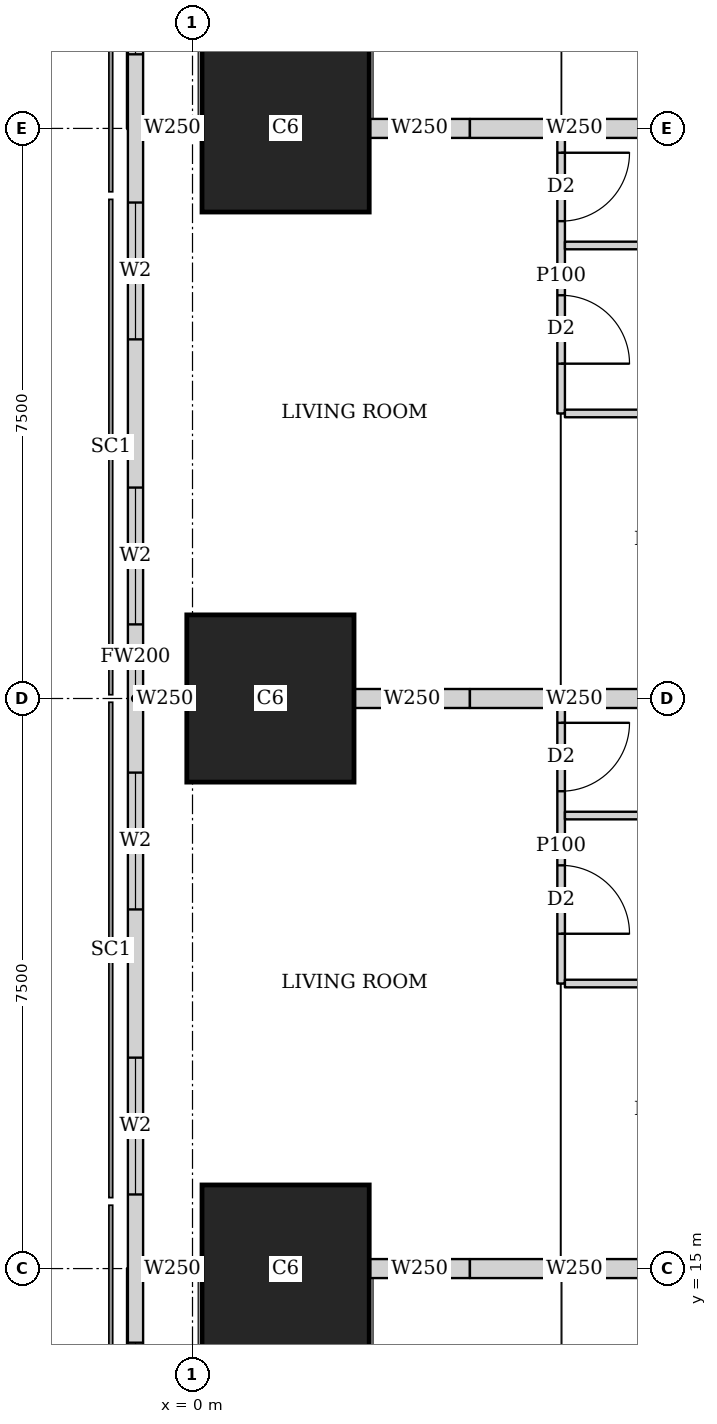
"""IFC4 building model, lengths in metres.
Left out: names, types, materials, properties, quantities, classifications, styles, units other than length and angle.
Written with IfcOpenShell. Run it as: python <this file> out.ifc"""

import sys

from ifc_helpers import new_model, si_unit, direction, frame, frame_2d, origin, origin_2d, place, context, subcontext, project, spatial, rectangle, extrude, element, fill, save


model = new_model("IFC4")
c1 = context("Model", 3, precision=1e-05, world=origin(), true_north=direction((0.0, 1.0)))
c2 = subcontext(c1, "Body", "Model", "MODEL_VIEW")
j1 = project(units=[si_unit("LENGTHUNIT", "METRE"), si_unit("PLANEANGLEUNIT", "RADIAN")], contexts=[c1])
p1 = place(None, origin())
s1 = spatial("IfcSite", under=j1, at=p1, CompositionType="ELEMENT")
p2 = place(p1, origin())
s2 = spatial("IfcBuilding", under=s1, at=p2, CompositionType="ELEMENT")
p3 = place(p2, frame((0.0, 0.0, 126.65)))
s3 = spatial("IfcBuildingStorey", under=s2, at=p3, CompositionType="ELEMENT", Elevation=126.65)
for number, where, z_axis, x_axis in (
    (1, (1.225, 15.0, 0.0), (0.0, 0.0, 1.0), (1.0, 0.0, 0.0)),
    (2, (1.025, 22.5, 0.0), (0.0, 0.0, 1.0), (1.0, 0.0, 0.0)),
    (3, (1.225, 30.0, 0.0), (0.0, 0.0, 1.0), (1.0, 0.0, 0.0)),
):
    element("IfcColumn", number, at=place(p3, frame(where, z_axis=z_axis, x_axis=x_axis)), inside=s3, PredefinedType="COLUMN", context=c2, shape_type="SweptSolid", body=[
        extrude(rectangle(XDim=2.2, YDim=2.2, at=origin_2d()), origin(), (0.0, 0.0, 1.0), 3.75),
    ])
p4 = place(p3, frame((-0.75, 42.837, 0.0), z_axis=(0.0, 0.0, 1.0), x_axis=(0.0, -1.0, 0.0)))
e4 = element("IfcWall", 4, at=p4, inside=s3, PredefinedType="SOLIDWALL", context=c2, shape_type="SweptSolid", body=[
    extrude(rectangle(XDim=40.674, YDim=0.2, at=frame_2d((20.337, 0.0))), origin(), (0.0, 0.0, 1.0), 3.45),
])
p5 = place(p4, frame((1.78, 0.0, 0.9)))
e5 = element("IfcOpeningElement", 5, at=p5, cuts=e4, PredefinedType="OPENING", context=c2, shape_type="SweptSolid", body=[
    extrude(rectangle(XDim=1.8, YDim=1.5, at=frame_2d((0.9, 0.75))), frame((0.0, 0.11, 0.0), z_axis=(0.0, -1.0, 0.0), x_axis=(1.0, 0.0, 0.0)), (0.0, 0.0, 1.0), 0.22),
])
p6 = place(p4, frame((6.312, 0.0, 0.9)))
e6 = element("IfcOpeningElement", 6, at=p6, cuts=e4, PredefinedType="OPENING", context=c2, shape_type="SweptSolid", body=[
    extrude(rectangle(XDim=1.8, YDim=1.5, at=frame_2d((0.9, 0.75))), frame((0.0, 0.11, 0.0), z_axis=(0.0, -1.0, 0.0), x_axis=(1.0, 0.0, 0.0)), (0.0, 0.0, 1.0), 0.22),
])
p7 = place(p4, frame((10.062, 0.0, 0.9)))
e7 = element("IfcOpeningElement", 7, at=p7, cuts=e4, PredefinedType="OPENING", context=c2, shape_type="SweptSolid", body=[
    extrude(rectangle(XDim=1.8, YDim=1.5, at=frame_2d((0.9, 0.75))), frame((0.0, 0.11, 0.0), z_axis=(0.0, -1.0, 0.0), x_axis=(1.0, 0.0, 0.0)), (0.0, 0.0, 1.0), 0.22),
])
p8 = place(p4, frame((13.812, 0.0, 0.9)))
e8 = element("IfcOpeningElement", 8, at=p8, cuts=e4, PredefinedType="OPENING", context=c2, shape_type="SweptSolid", body=[
    extrude(rectangle(XDim=1.8, YDim=1.5, at=frame_2d((0.9, 0.75))), frame((0.0, 0.11, 0.0), z_axis=(0.0, -1.0, 0.0), x_axis=(1.0, 0.0, 0.0)), (0.0, 0.0, 1.0), 0.22),
])
p9 = place(p4, frame((17.562, 0.0, 0.9)))
e9 = element("IfcOpeningElement", 9, at=p9, cuts=e4, PredefinedType="OPENING", context=c2, shape_type="SweptSolid", body=[
    extrude(rectangle(XDim=1.8, YDim=1.5, at=frame_2d((0.9, 0.75))), frame((0.0, 0.11, 0.0), z_axis=(0.0, -1.0, 0.0), x_axis=(1.0, 0.0, 0.0)), (0.0, 0.0, 1.0), 0.22),
])
p10 = place(p4, frame((21.312, 0.0, 0.9)))
e10 = element("IfcOpeningElement", 10, at=p10, cuts=e4, PredefinedType="OPENING", context=c2, shape_type="SweptSolid", body=[
    extrude(rectangle(XDim=1.8, YDim=1.5, at=frame_2d((0.9, 0.75))), frame((0.0, 0.11, 0.0), z_axis=(0.0, -1.0, 0.0), x_axis=(1.0, 0.0, 0.0)), (0.0, 0.0, 1.0), 0.22),
])
p11 = place(p4, frame((25.062, 0.0, 0.9)))
e11 = element("IfcOpeningElement", 11, at=p11, cuts=e4, PredefinedType="OPENING", context=c2, shape_type="SweptSolid", body=[
    extrude(rectangle(XDim=1.8, YDim=1.5, at=frame_2d((0.9, 0.75))), frame((0.0, 0.11, 0.0), z_axis=(0.0, -1.0, 0.0), x_axis=(1.0, 0.0, 0.0)), (0.0, 0.0, 1.0), 0.22),
])
p12 = place(p4, frame((28.812, 0.0, 0.9)))
e12 = element("IfcOpeningElement", 12, at=p12, cuts=e4, PredefinedType="OPENING", context=c2, shape_type="SweptSolid", body=[
    extrude(rectangle(XDim=1.8, YDim=1.5, at=frame_2d((0.9, 0.75))), frame((0.0, 0.11, 0.0), z_axis=(0.0, -1.0, 0.0), x_axis=(1.0, 0.0, 0.0)), (0.0, 0.0, 1.0), 0.22),
])
p13 = place(p4, frame((32.562, 0.0, 0.9)))
e13 = element("IfcOpeningElement", 13, at=p13, cuts=e4, PredefinedType="OPENING", context=c2, shape_type="SweptSolid", body=[
    extrude(rectangle(XDim=1.8, YDim=1.5, at=frame_2d((0.9, 0.75))), frame((0.0, 0.11, 0.0), z_axis=(0.0, -1.0, 0.0), x_axis=(1.0, 0.0, 0.0)), (0.0, 0.0, 1.0), 0.22),
])
p14 = place(p4, frame((37.094, 0.0, 0.9)))
e14 = element("IfcOpeningElement", 14, at=p14, cuts=e4, PredefinedType="OPENING", context=c2, shape_type="SweptSolid", body=[
    extrude(rectangle(XDim=1.8, YDim=1.5, at=frame_2d((0.9, 0.75))), frame((0.0, 0.11, 0.0), z_axis=(0.0, -1.0, 0.0), x_axis=(1.0, 0.0, 0.0)), (0.0, 0.0, 1.0), 0.22),
])
p15 = place(p3, frame((4.85, 18.75, 0.0), z_axis=(0.0, 0.0, 1.0), x_axis=(0.0, 1.0, 0.0)))
e15 = element("IfcWall", 15, at=p15, inside=s3, PredefinedType="PARTITIONING", context=c2, shape_type="SweptSolid", body=[
    extrude(rectangle(XDim=3.625, YDim=0.1, at=frame_2d((1.812, 0.0))), origin(), (0.0, 0.0, 1.0), 3.45),
])
p16 = place(p15, frame((0.655, 0.0, 0.0)))
e16 = element("IfcOpeningElement", 16, at=p16, cuts=e15, PredefinedType="OPENING", context=c2, shape_type="SweptSolid", body=[
    extrude(rectangle(XDim=0.9, YDim=2.1, at=frame_2d((0.45, 1.05))), frame((0.0, 0.06, 0.0), z_axis=(0.0, -1.0, 0.0), x_axis=(1.0, 0.0, 0.0)), (0.0, 0.0, 1.0), 0.12),
])
p17 = place(p15, frame((2.53, 0.0, 0.0)))
e17 = element("IfcOpeningElement", 17, at=p17, cuts=e15, PredefinedType="OPENING", context=c2, shape_type="SweptSolid", body=[
    extrude(rectangle(XDim=0.9, YDim=2.1, at=frame_2d((0.45, 1.05))), frame((0.0, 0.06, 0.0), z_axis=(0.0, -1.0, 0.0), x_axis=(1.0, 0.0, 0.0)), (0.0, 0.0, 1.0), 0.12),
])
for number, where, z_axis, x_axis in (
    (18, (4.9, 18.75, 0.0), (0.0, 0.0, 1.0), (1.0, 0.0, 0.0)),
    (19, (4.9, 20.96, 0.0), (0.0, 0.0, 1.0), (1.0, 0.0, 0.0)),
):
    element("IfcWall", number, at=place(p3, frame(where, z_axis=z_axis, x_axis=x_axis)), inside=s3, PredefinedType="PARTITIONING", context=c2, shape_type="SweptSolid", body=[
        extrude(rectangle(XDim=3.275, YDim=0.1, at=frame_2d((1.638, 0.0))), origin(), (0.0, 0.0, 1.0), 3.45),
    ])
p18 = place(p3, frame((-0.65, 15.0, 0.0), z_axis=(0.0, 0.0, 1.0), x_axis=(1.0, 0.0, 0.0)))
e20 = element("IfcWall", 20, at=p18, inside=s3, PredefinedType="SOLIDWALL", context=c2, shape_type="SweptSolid", body=[
    extrude(rectangle(XDim=0.774, YDim=0.25, at=frame_2d((0.387, 0.0))), origin(), (0.0, 0.0, 1.0), 3.45),
])
p19 = place(p3, frame((2.326, 15.0, 0.0), z_axis=(0.0, 0.0, 1.0), x_axis=(1.0, 0.0, 0.0)))
e21 = element("IfcWall", 21, at=p19, inside=s3, PredefinedType="SOLIDWALL", context=c2, shape_type="SweptSolid", body=[
    extrude(rectangle(XDim=1.324, YDim=0.25, at=frame_2d((0.662, 0.0))), origin(), (0.0, 0.0, 1.0), 3.45),
])
p20 = place(p3, frame((3.65, 15.0, 0.0), z_axis=(0.0, 0.0, 1.0), x_axis=(1.0, 0.0, 0.0)))
e22 = element("IfcWall", 22, at=p20, inside=s3, PredefinedType="SOLIDWALL", context=c2, shape_type="SweptSolid", body=[
    extrude(rectangle(XDim=2.749, YDim=0.25, at=frame_2d((1.375, 0.0))), origin(), (0.0, 0.0, 1.0), 3.45),
])
p21 = place(p3, frame((4.85, 26.25, 0.0), z_axis=(0.0, 0.0, 1.0), x_axis=(0.0, 1.0, 0.0)))
e23 = element("IfcWall", 23, at=p21, inside=s3, PredefinedType="PARTITIONING", context=c2, shape_type="SweptSolid", body=[
    extrude(rectangle(XDim=3.625, YDim=0.1, at=frame_2d((1.812, 0.0))), origin(), (0.0, 0.0, 1.0), 3.45),
])
p22 = place(p21, frame((0.655, 0.0, 0.0)))
e24 = element("IfcOpeningElement", 24, at=p22, cuts=e23, PredefinedType="OPENING", context=c2, shape_type="SweptSolid", body=[
    extrude(rectangle(XDim=0.9, YDim=2.1, at=frame_2d((0.45, 1.05))), frame((0.0, 0.06, 0.0), z_axis=(0.0, -1.0, 0.0), x_axis=(1.0, 0.0, 0.0)), (0.0, 0.0, 1.0), 0.12),
])
p23 = place(p21, frame((2.53, 0.0, 0.0)))
e25 = element("IfcOpeningElement", 25, at=p23, cuts=e23, PredefinedType="OPENING", context=c2, shape_type="SweptSolid", body=[
    extrude(rectangle(XDim=0.9, YDim=2.1, at=frame_2d((0.45, 1.05))), frame((0.0, 0.06, 0.0), z_axis=(0.0, -1.0, 0.0), x_axis=(1.0, 0.0, 0.0)), (0.0, 0.0, 1.0), 0.12),
])
for number, where, z_axis, x_axis in (
    (26, (4.9, 26.25, 0.0), (0.0, 0.0, 1.0), (1.0, 0.0, 0.0)),
    (27, (4.9, 28.46, 0.0), (0.0, 0.0, 1.0), (1.0, 0.0, 0.0)),
):
    element("IfcWall", number, at=place(p3, frame(where, z_axis=z_axis, x_axis=x_axis)), inside=s3, PredefinedType="PARTITIONING", context=c2, shape_type="SweptSolid", body=[
        extrude(rectangle(XDim=3.275, YDim=0.1, at=frame_2d((1.638, 0.0))), origin(), (0.0, 0.0, 1.0), 3.45),
    ])
p24 = place(p3, frame((-0.65, 22.5, 0.0), z_axis=(0.0, 0.0, 1.0), x_axis=(1.0, 0.0, 0.0)))
e28 = element("IfcWall", 28, at=p24, inside=s3, PredefinedType="SOLIDWALL", context=c2, shape_type="SweptSolid", body=[
    extrude(rectangle(XDim=0.574, YDim=0.25, at=frame_2d((0.287, 0.0))), origin(), (0.0, 0.0, 1.0), 3.45),
])
p25 = place(p3, frame((2.126, 22.5, 0.0), z_axis=(0.0, 0.0, 1.0), x_axis=(1.0, 0.0, 0.0)))
e29 = element("IfcWall", 29, at=p25, inside=s3, PredefinedType="SOLIDWALL", context=c2, shape_type="SweptSolid", body=[
    extrude(rectangle(XDim=1.524, YDim=0.25, at=frame_2d((0.762, 0.0))), origin(), (0.0, 0.0, 1.0), 3.45),
])
p26 = place(p3, frame((3.65, 22.5, 0.0), z_axis=(0.0, 0.0, 1.0), x_axis=(1.0, 0.0, 0.0)))
e30 = element("IfcWall", 30, at=p26, inside=s3, PredefinedType="SOLIDWALL", context=c2, shape_type="SweptSolid", body=[
    extrude(rectangle(XDim=2.749, YDim=0.25, at=frame_2d((1.375, 0.0))), origin(), (0.0, 0.0, 1.0), 3.45),
])
p27 = place(p3, frame((-0.65, 30.0, 0.0), z_axis=(0.0, 0.0, 1.0), x_axis=(1.0, 0.0, 0.0)))
e31 = element("IfcWall", 31, at=p27, inside=s3, PredefinedType="SOLIDWALL", context=c2, shape_type="SweptSolid", body=[
    extrude(rectangle(XDim=0.774, YDim=0.25, at=frame_2d((0.387, 0.0))), origin(), (0.0, 0.0, 1.0), 3.45),
])
p28 = place(p3, frame((2.326, 30.0, 0.0), z_axis=(0.0, 0.0, 1.0), x_axis=(1.0, 0.0, 0.0)))
e32 = element("IfcWall", 32, at=p28, inside=s3, PredefinedType="SOLIDWALL", context=c2, shape_type="SweptSolid", body=[
    extrude(rectangle(XDim=1.324, YDim=0.25, at=frame_2d((0.662, 0.0))), origin(), (0.0, 0.0, 1.0), 3.45),
])
p29 = place(p3, frame((3.65, 30.0, 0.0), z_axis=(0.0, 0.0, 1.0), x_axis=(1.0, 0.0, 0.0)))
e33 = element("IfcWall", 33, at=p29, inside=s3, PredefinedType="SOLIDWALL", context=c2, shape_type="SweptSolid", body=[
    extrude(rectangle(XDim=2.749, YDim=0.25, at=frame_2d((1.375, 0.0))), origin(), (0.0, 0.0, 1.0), 3.45),
])
p30 = place(p7, origin())
e34 = element("IfcWindow", 34, at=p30, inside=s3, PartitioningType="SINGLE_PANEL", PredefinedType="WINDOW", context=c2, shape_type="SweptSolid", body=[
    extrude(rectangle(XDim=1.8, YDim=1.5, at=frame_2d((0.9, 0.75))), frame((0.0, 0.03, 0.0), z_axis=(0.0, -1.0, 0.0), x_axis=(1.0, 0.0, 0.0)), (0.0, 0.0, 1.0), 0.06),
])
fill(e7, e34)
p31 = place(p8, origin())
e35 = element("IfcWindow", 35, at=p31, inside=s3, PartitioningType="SINGLE_PANEL", PredefinedType="WINDOW", context=c2, shape_type="SweptSolid", body=[
    extrude(rectangle(XDim=1.8, YDim=1.5, at=frame_2d((0.9, 0.75))), frame((0.0, 0.03, 0.0), z_axis=(0.0, -1.0, 0.0), x_axis=(1.0, 0.0, 0.0)), (0.0, 0.0, 1.0), 0.06),
])
fill(e8, e35)
p32 = place(p9, origin())
e36 = element("IfcWindow", 36, at=p32, inside=s3, PartitioningType="SINGLE_PANEL", PredefinedType="WINDOW", context=c2, shape_type="SweptSolid", body=[
    extrude(rectangle(XDim=1.8, YDim=1.5, at=frame_2d((0.9, 0.75))), frame((0.0, 0.03, 0.0), z_axis=(0.0, -1.0, 0.0), x_axis=(1.0, 0.0, 0.0)), (0.0, 0.0, 1.0), 0.06),
])
fill(e9, e36)
p33 = place(p10, origin())
e37 = element("IfcWindow", 37, at=p33, inside=s3, PartitioningType="SINGLE_PANEL", PredefinedType="WINDOW", context=c2, shape_type="SweptSolid", body=[
    extrude(rectangle(XDim=1.8, YDim=1.5, at=frame_2d((0.9, 0.75))), frame((0.0, 0.03, 0.0), z_axis=(0.0, -1.0, 0.0), x_axis=(1.0, 0.0, 0.0)), (0.0, 0.0, 1.0), 0.06),
])
fill(e10, e37)
p34 = place(p11, origin())
e38 = element("IfcWindow", 38, at=p34, inside=s3, PartitioningType="SINGLE_PANEL", PredefinedType="WINDOW", context=c2, shape_type="SweptSolid", body=[
    extrude(rectangle(XDim=1.8, YDim=1.5, at=frame_2d((0.9, 0.75))), frame((0.0, 0.03, 0.0), z_axis=(0.0, -1.0, 0.0), x_axis=(1.0, 0.0, 0.0)), (0.0, 0.0, 1.0), 0.06),
])
fill(e11, e38)
p35 = place(p12, origin())
e39 = element("IfcWindow", 39, at=p35, inside=s3, PartitioningType="SINGLE_PANEL", PredefinedType="WINDOW", context=c2, shape_type="SweptSolid", body=[
    extrude(rectangle(XDim=1.8, YDim=1.5, at=frame_2d((0.9, 0.75))), frame((0.0, 0.03, 0.0), z_axis=(0.0, -1.0, 0.0), x_axis=(1.0, 0.0, 0.0)), (0.0, 0.0, 1.0), 0.06),
])
fill(e12, e39)
p36 = place(p16, origin())
e40 = element("IfcDoor", 40, at=p36, inside=s3, OperationType="SINGLE_SWING_RIGHT", PredefinedType="DOOR", context=c2, shape_type="SweptSolid", body=[
    extrude(rectangle(XDim=0.9, YDim=2.1, at=frame_2d((0.45, 1.05))), frame((0.0, 0.025, 0.0), z_axis=(0.0, -1.0, 0.0), x_axis=(1.0, 0.0, 0.0)), (0.0, 0.0, 1.0), 0.05),
])
fill(e16, e40)
p37 = place(p17, origin())
e41 = element("IfcDoor", 41, at=p37, inside=s3, OperationType="SINGLE_SWING_LEFT", PredefinedType="DOOR", context=c2, shape_type="SweptSolid", body=[
    extrude(rectangle(XDim=0.9, YDim=2.1, at=frame_2d((0.45, 1.05))), frame((0.0, 0.025, 0.0), z_axis=(0.0, -1.0, 0.0), x_axis=(1.0, 0.0, 0.0)), (0.0, 0.0, 1.0), 0.05),
])
fill(e17, e41)
p38 = place(p22, origin())
e42 = element("IfcDoor", 42, at=p38, inside=s3, OperationType="SINGLE_SWING_RIGHT", PredefinedType="DOOR", context=c2, shape_type="SweptSolid", body=[
    extrude(rectangle(XDim=0.9, YDim=2.1, at=frame_2d((0.45, 1.05))), frame((0.0, 0.025, 0.0), z_axis=(0.0, -1.0, 0.0), x_axis=(1.0, 0.0, 0.0)), (0.0, 0.0, 1.0), 0.05),
])
fill(e24, e42)
p39 = place(p23, origin())
e43 = element("IfcDoor", 43, at=p39, inside=s3, OperationType="SINGLE_SWING_LEFT", PredefinedType="DOOR", context=c2, shape_type="SweptSolid", body=[
    extrude(rectangle(XDim=0.9, YDim=2.1, at=frame_2d((0.45, 1.05))), frame((0.0, 0.025, 0.0), z_axis=(0.0, -1.0, 0.0), x_axis=(1.0, 0.0, 0.0)), (0.0, 0.0, 1.0), 0.05),
])
fill(e25, e43)
save(model, sys.argv[1])
